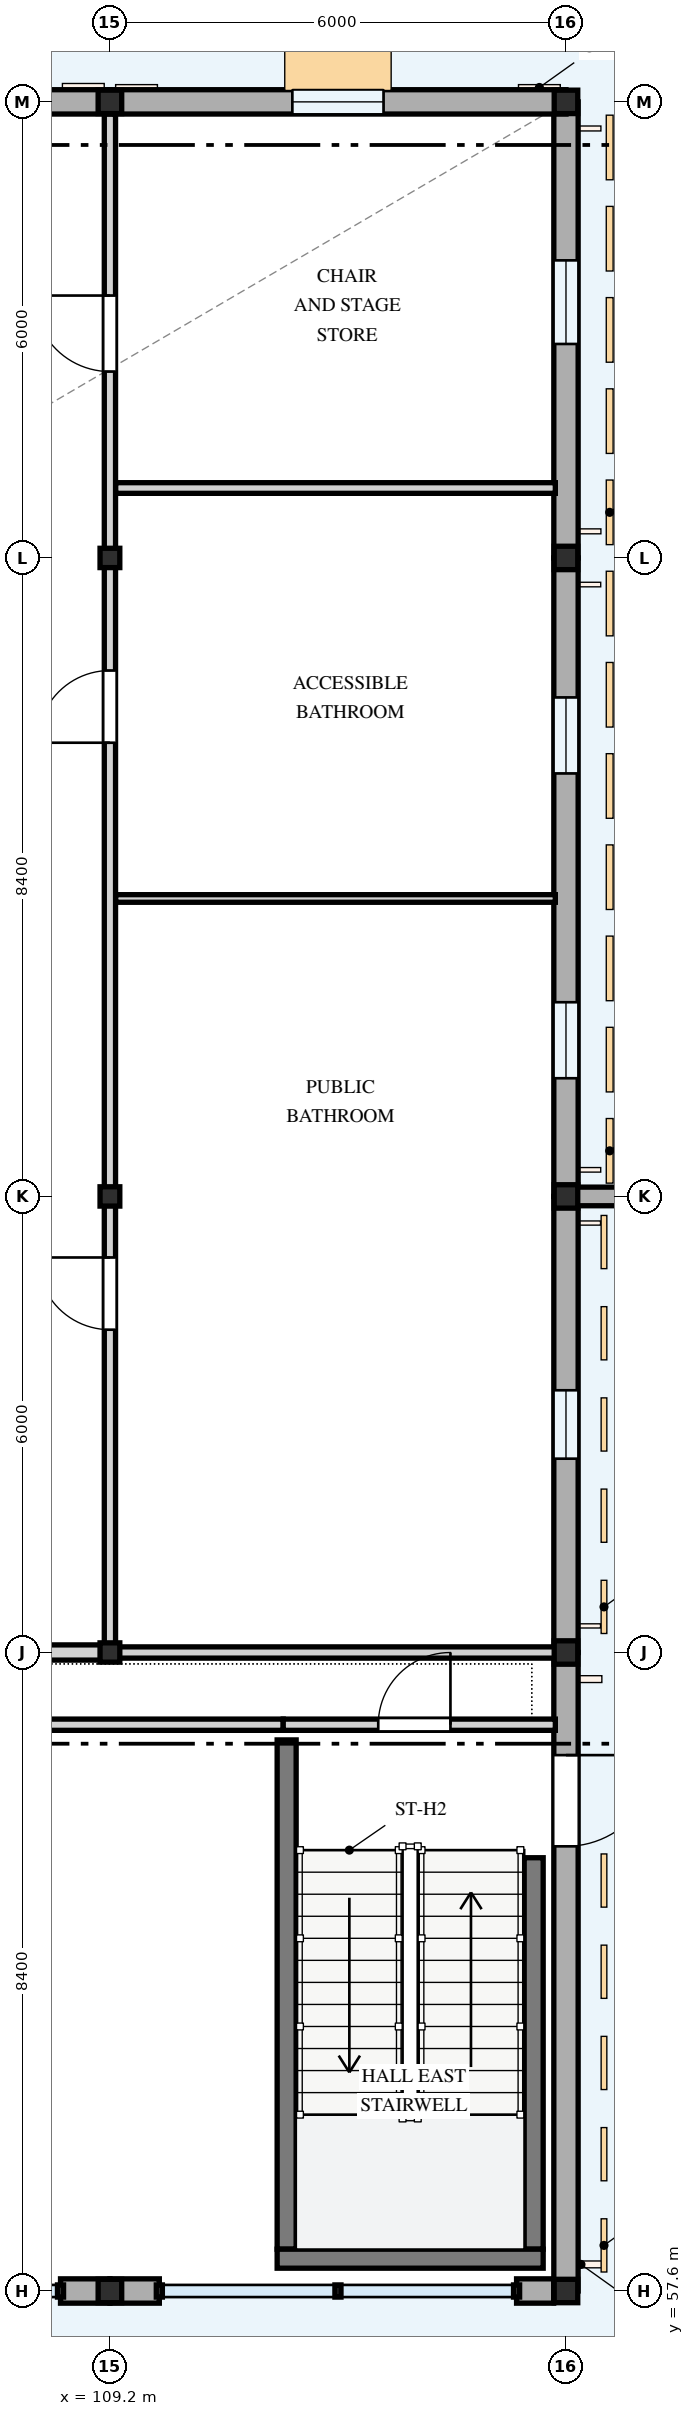
"""IFC4 building model, lengths in metres.
Left out: names, types, materials, properties, quantities, classifications, styles, units other than length and angle.
Written with IfcOpenShell. Run it as: python <this file> out.ifc"""

import sys

from ifc_helpers import new_model, si_unit, direction, frame, frame_2d, origin, origin_2d, place, context, subcontext, project, spatial, rectangle, i_section, extrude, element, fill, save


model = new_model("IFC4")
c1 = context("Model", 3, precision=1e-05, world=origin(), true_north=direction((0.0, 1.0)))
c2 = subcontext(c1, "Body", "Model", "MODEL_VIEW")
j1 = project(units=[si_unit("LENGTHUNIT", "METRE"), si_unit("PLANEANGLEUNIT", "RADIAN")], contexts=[c1])
p1 = place(None, origin())
s1 = spatial("IfcSite", under=j1, at=p1, CompositionType="ELEMENT")
p2 = place(p1, origin())
s2 = spatial("IfcBuilding", under=s1, at=p2, CompositionType="ELEMENT")
p3 = place(p2, origin())
s3 = spatial("IfcBuildingStorey", under=s2, at=p3, CompositionType="ELEMENT", Elevation=0.0)
p4 = place(p3, frame((109.2, 57.6, 0.0), z_axis=(0.0, 0.0, 1.0), x_axis=(1.0, 0.0, 0.0)))
e1 = element("IfcColumn", 1, at=p4, inside=s3, PredefinedType="COLUMN", context=c2, shape_type="SweptSolid", body=[
    extrude(i_section(OverallWidth=0.31, OverallDepth=0.308, WebThickness=0.015, FlangeThickness=0.015, FilletRadius=0.012, at=origin_2d()), origin(), (0.0, 0.0, 1.0), 4.5),
])
for number, where, z_axis, x_axis in (
    (2, (109.2, 66.0, 0.0), (0.0, 0.0, 1.0), (1.0, 0.0, 0.0)),
    (3, (109.2, 72.0, 0.0), (0.0, 0.0, 1.0), (1.0, 0.0, 0.0)),
    (4, (109.2, 80.4, 0.0), (0.0, 0.0, 1.0), (1.0, 0.0, 0.0)),
):
    element("IfcColumn", number, at=place(p3, frame(where, z_axis=z_axis, x_axis=x_axis)), inside=s3, PredefinedType="COLUMN", context=c2, shape_type="SweptSolid", body=[
        extrude(i_section(OverallWidth=0.26, OverallDepth=0.254, WebThickness=0.014, FlangeThickness=0.014, FilletRadius=0.01, at=origin_2d()), origin(), (0.0, 0.0, 1.0), 4.5),
    ])
for number, where, z_axis, x_axis in (
    (5, (109.2, 86.4, 0.0), (0.0, 0.0, 1.0), (1.0, 0.0, 0.0)),
    (6, (115.2, 57.6, 0.0), (0.0, 0.0, 1.0), (1.0, 0.0, 0.0)),
    (7, (115.2, 66.0, 0.0), (0.0, 0.0, 1.0), (1.0, 0.0, 0.0)),
    (8, (115.2, 72.0, 0.0), (0.0, 0.0, 1.0), (1.0, 0.0, 0.0)),
    (9, (115.2, 80.4, 0.0), (0.0, 0.0, 1.0), (1.0, 0.0, 0.0)),
    (10, (115.2, 86.4, 0.0), (0.0, 0.0, 1.0), (1.0, 0.0, 0.0)),
):
    element("IfcColumn", number, at=place(p3, frame(where, z_axis=z_axis, x_axis=x_axis)), inside=s3, PredefinedType="COLUMN", context=c2, shape_type="SweptSolid", body=[
        extrude(i_section(OverallWidth=0.31, OverallDepth=0.308, WebThickness=0.015, FlangeThickness=0.015, FilletRadius=0.012, at=origin_2d()), origin(), (0.0, 0.0, 1.0), 4.5),
    ])
p5 = place(p3, frame((108.55, 57.6, 0.0), z_axis=(0.0, 0.0, 1.0), x_axis=(1.0, 0.0, 0.0)))
e11 = element("IfcWall", 11, at=p5, inside=s3, PredefinedType="STANDARD", context=c2, shape_type="SweptSolid", body=[
    extrude(rectangle(XDim=0.65, YDim=0.32, at=frame_2d((0.325, 0.0))), origin(), (0.0, 0.0, 1.0), 3.646),
])
p6 = place(p3, frame((109.2, 57.6, 0.0), z_axis=(0.0, 0.0, 1.0), x_axis=(1.0, 0.0, 0.0)))
e12 = element("IfcWall", 12, at=p6, inside=s3, PredefinedType="STANDARD", context=c2, shape_type="SweptSolid", body=[
    extrude(rectangle(XDim=0.65, YDim=0.32, at=frame_2d((0.325, 0.0))), origin(), (0.0, 0.0, 1.0), 3.722),
])
p7 = place(p3, frame((114.55, 57.6, 0.0), z_axis=(0.0, 0.0, 1.0), x_axis=(1.0, 0.0, 0.0)))
e13 = element("IfcWall", 13, at=p7, inside=s3, PredefinedType="STANDARD", context=c2, shape_type="SweptSolid", body=[
    extrude(rectangle(XDim=0.488, YDim=0.32, at=frame_2d((0.244, 0.0))), origin(), (0.0, 0.0, 1.0), 3.722),
])
p8 = place(p3, frame((115.2, 57.6, 0.0), z_axis=(0.0, 0.0, 1.0), x_axis=(0.0, 1.0, 0.0)))
e14 = element("IfcWall", 14, at=p8, inside=s3, PredefinedType="STANDARD", context=c2, shape_type="SweptSolid", body=[
    extrude(rectangle(XDim=8.4, YDim=0.32, at=frame_2d((4.2, 0.0))), origin(), (0.0, 0.0, 1.0), 3.65),
])
p9 = place(p8, frame((5.85, 0.0, 0.0)))
e15 = element("IfcOpeningElement", 15, at=p9, cuts=e14, PredefinedType="OPENING", context=c2, shape_type="SweptSolid", body=[
    extrude(rectangle(XDim=1.2, YDim=2.2, at=frame_2d((0.6, 1.1))), frame((0.0, 0.17, 0.0), z_axis=(0.0, -1.0, 0.0), x_axis=(1.0, 0.0, 0.0)), (0.0, 0.0, 1.0), 0.34),
])
p10 = place(p3, frame((115.2, 66.0, 0.0), z_axis=(0.0, 0.0, 1.0), x_axis=(0.0, 1.0, 0.0)))
e16 = element("IfcWall", 16, at=p10, inside=s3, PredefinedType="STANDARD", context=c2, shape_type="SweptSolid", body=[
    extrude(rectangle(XDim=6.0, YDim=0.32, at=frame_2d((3.0, 0.0))), origin(), (0.0, 0.0, 1.0), 3.772),
])
p11 = place(p10, frame((2.55, 0.0, 0.85)))
e17 = element("IfcOpeningElement", 17, at=p11, cuts=e16, PredefinedType="OPENING", context=c2, shape_type="SweptSolid", body=[
    extrude(rectangle(XDim=0.9, YDim=1.2, at=frame_2d((0.45, 0.6))), frame((0.0, 0.17, 0.0), z_axis=(0.0, -1.0, 0.0), x_axis=(1.0, 0.0, 0.0)), (0.0, 0.0, 1.0), 0.34),
])
p12 = place(p3, frame((115.2, 72.0, 0.0), z_axis=(0.0, 0.0, 1.0), x_axis=(0.0, 1.0, 0.0)))
e18 = element("IfcWall", 18, at=p12, inside=s3, PredefinedType="STANDARD", context=c2, shape_type="SweptSolid", body=[
    extrude(rectangle(XDim=8.4, YDim=0.32, at=frame_2d((4.2, 0.0))), origin(), (0.0, 0.0, 1.0), 3.65),
])
p13 = place(p12, frame((1.555, 0.0, 0.85)))
e19 = element("IfcOpeningElement", 19, at=p13, cuts=e18, PredefinedType="OPENING", context=c2, shape_type="SweptSolid", body=[
    extrude(rectangle(XDim=1.0, YDim=1.25, at=frame_2d((0.5, 0.625))), frame((0.0, 0.17, 0.0), z_axis=(0.0, -1.0, 0.0), x_axis=(1.0, 0.0, 0.0)), (0.0, 0.0, 1.0), 0.34),
])
p14 = place(p12, frame((5.565, 0.0, 0.85)))
e20 = element("IfcOpeningElement", 20, at=p14, cuts=e18, PredefinedType="OPENING", context=c2, shape_type="SweptSolid", body=[
    extrude(rectangle(XDim=1.0, YDim=1.25, at=frame_2d((0.5, 0.625))), frame((0.0, 0.17, 0.0), z_axis=(0.0, -1.0, 0.0), x_axis=(1.0, 0.0, 0.0)), (0.0, 0.0, 1.0), 0.34),
])
p15 = place(p3, frame((115.2, 80.4, 0.0), z_axis=(0.0, 0.0, 1.0), x_axis=(0.0, 1.0, 0.0)))
e21 = element("IfcWall", 21, at=p15, inside=s3, PredefinedType="STANDARD", context=c2, shape_type="SweptSolid", body=[
    extrude(rectangle(XDim=6.0, YDim=0.32, at=frame_2d((3.0, 0.0))), origin(), (0.0, 0.0, 1.0), 3.772),
])
p16 = place(p15, frame((2.815, 0.0, 0.85)))
e22 = element("IfcOpeningElement", 22, at=p16, cuts=e21, PredefinedType="OPENING", context=c2, shape_type="SweptSolid", body=[
    extrude(rectangle(XDim=1.1, YDim=1.3, at=frame_2d((0.55, 0.65))), frame((0.0, 0.17, 0.0), z_axis=(0.0, -1.0, 0.0), x_axis=(1.0, 0.0, 0.0)), (0.0, 0.0, 1.0), 0.34),
])
p17 = place(p3, frame((115.2, 86.4, 0.0), z_axis=(0.0, 0.0, 1.0), x_axis=(-1.0, 0.0, 0.0)))
e23 = element("IfcWall", 23, at=p17, inside=s3, PredefinedType="STANDARD", context=c2, shape_type="SweptSolid", body=[
    extrude(rectangle(XDim=6.0, YDim=0.32, at=frame_2d((3.0, 0.0))), origin(), (0.0, 0.0, 1.0), 3.722),
])
p18 = place(p17, frame((2.4, 0.0, 0.85)))
e24 = element("IfcOpeningElement", 24, at=p18, cuts=e23, PredefinedType="OPENING", context=c2, shape_type="SweptSolid", body=[
    extrude(rectangle(XDim=1.2, YDim=1.35, at=frame_2d((0.6, 0.675))), frame((0.0, 0.17, 0.0), z_axis=(0.0, -1.0, 0.0), x_axis=(1.0, 0.0, 0.0)), (0.0, 0.0, 1.0), 0.34),
])
p19 = place(p3, frame((109.2, 86.4, 0.0), z_axis=(0.0, 0.0, 1.0), x_axis=(-1.0, 0.0, 0.0)))
e25 = element("IfcWall", 25, at=p19, inside=s3, PredefinedType="STANDARD", context=c2, shape_type="SweptSolid", body=[
    extrude(rectangle(XDim=8.4, YDim=0.32, at=frame_2d((4.2, 0.0))), origin(), (0.0, 0.0, 1.0), 3.646),
])
p20 = place(p19, frame((3.6, 0.0, 0.85)))
e26 = element("IfcOpeningElement", 26, at=p20, cuts=e25, PredefinedType="OPENING", context=c2, shape_type="SweptSolid", body=[
    extrude(rectangle(XDim=1.2, YDim=1.5, at=frame_2d((0.6, 0.75))), frame((0.0, 0.17, 0.0), z_axis=(0.0, -1.0, 0.0), x_axis=(1.0, 0.0, 0.0)), (0.0, 0.0, 1.0), 0.34),
])
p21 = place(p3, frame((115.2, 72.0, 0.0), z_axis=(0.0, 0.0, 1.0), x_axis=(1.0, 0.0, 0.0)))
e27 = element("IfcWall", 27, at=p21, inside=s3, PredefinedType="STANDARD", context=c2, shape_type="SweptSolid", body=[
    extrude(rectangle(XDim=22.8, YDim=0.245, at=frame_2d((11.4, 0.0))), origin(), (0.0, 0.0, 1.0), 2.35),
])
p22 = place(p21, frame((10.675, 0.0, 0.0)))
e28 = element("IfcOpeningElement", 28, at=p22, cuts=e27, PredefinedType="OPENING", context=c2, shape_type="SweptSolid", body=[
    extrude(rectangle(XDim=1.45, YDim=2.1, at=frame_2d((0.725, 1.05))), frame((0.0, 0.133, 0.0), z_axis=(0.0, -1.0, 0.0), x_axis=(1.0, 0.0, 0.0)), (0.0, 0.0, 1.0), 0.265),
])
p23 = place(p3, frame((111.525, 64.85, 0.0), z_axis=(0.0, 0.0, 1.0), x_axis=(0.0, -1.0, 0.0)))
e29 = element("IfcWall", 29, at=p23, inside=s3, PredefinedType="SHEAR", context=c2, shape_type="SweptSolid", body=[
    extrude(rectangle(XDim=6.7, YDim=0.25, at=frame_2d((3.35, 0.0))), origin(), (0.0, 0.0, 1.0), 4.2),
])
p24 = place(p3, frame((114.775, 63.3, 0.0), z_axis=(0.0, 0.0, 1.0), x_axis=(0.0, -1.0, 0.0)))
e30 = element("IfcWall", 30, at=p24, inside=s3, PredefinedType="SHEAR", context=c2, shape_type="SweptSolid", body=[
    extrude(rectangle(XDim=5.15, YDim=0.25, at=frame_2d((2.575, 0.0))), origin(), (0.0, 0.0, 1.0), 4.2),
])
p25 = place(p3, frame((111.4, 58.025, 0.0), z_axis=(0.0, 0.0, 1.0), x_axis=(1.0, 0.0, 0.0)))
e31 = element("IfcWall", 31, at=p25, inside=s3, PredefinedType="SHEAR", context=c2, shape_type="SweptSolid", body=[
    extrude(rectangle(XDim=3.5, YDim=0.25, at=frame_2d((1.75, 0.0))), origin(), (0.0, 0.0, 1.0), 4.2),
])
p26 = place(p3, frame((72.0, 66.0, 0.0), z_axis=(0.0, 0.0, 1.0), x_axis=(1.0, 0.0, 0.0)))
e32 = element("IfcWall", 32, at=p26, inside=s3, PredefinedType="PARTITIONING", context=c2, shape_type="SweptSolid", body=[
    extrude(rectangle(XDim=37.2, YDim=0.2, at=frame_2d((18.6, 0.0))), origin(), (0.0, 0.0, 1.0), 3.266),
])
p27 = place(p26, frame((17.001, 0.0, 0.0)))
e33 = element("IfcOpeningElement", 33, at=p27, cuts=e32, PredefinedType="OPENING", context=c2, shape_type="SweptSolid", body=[
    extrude(rectangle(XDim=1.65, YDim=2.3, at=frame_2d((0.825, 1.15))), frame((0.0, 0.11, 0.0), z_axis=(0.0, -1.0, 0.0), x_axis=(1.0, 0.0, 0.0)), (0.0, 0.0, 1.0), 0.22),
])
p28 = place(p26, frame((25.391, 0.0, 0.0)))
e34 = element("IfcOpeningElement", 34, at=p28, cuts=e32, PredefinedType="OPENING", context=c2, shape_type="SweptSolid", body=[
    extrude(rectangle(XDim=1.8, YDim=2.4, at=frame_2d((0.9, 1.2))), frame((0.0, 0.11, 0.0), z_axis=(0.0, -1.0, 0.0), x_axis=(1.0, 0.0, 0.0)), (0.0, 0.0, 1.0), 0.22),
])
p29 = place(p3, frame((109.2, 66.102, 0.0), z_axis=(0.0, 0.0, 1.0), x_axis=(0.0, 1.0, 0.0)))
e35 = element("IfcWall", 35, at=p29, inside=s3, PredefinedType="PARTITIONING", context=c2, shape_type="SweptSolid", body=[
    extrude(rectangle(XDim=20.136, YDim=0.148, at=frame_2d((10.068, 0.0))), origin(), (0.0, 0.0, 1.0), 3.65),
])
p30 = place(p29, frame((4.145, 0.0, 0.0)))
e36 = element("IfcOpeningElement", 36, at=p30, cuts=e35, PredefinedType="OPENING", context=c2, shape_type="SweptSolid", body=[
    extrude(rectangle(XDim=0.95, YDim=2.1, at=frame_2d((0.475, 1.05))), frame((0.0, 0.084, 0.0), z_axis=(0.0, -1.0, 0.0), x_axis=(1.0, 0.0, 0.0)), (0.0, 0.0, 1.0), 0.168),
])
p31 = place(p29, frame((11.867, 0.0, 0.0)))
e37 = element("IfcOpeningElement", 37, at=p31, cuts=e35, PredefinedType="OPENING", context=c2, shape_type="SweptSolid", body=[
    extrude(rectangle(XDim=0.95, YDim=2.1, at=frame_2d((0.475, 1.05))), frame((0.0, 0.084, 0.0), z_axis=(0.0, -1.0, 0.0), x_axis=(1.0, 0.0, 0.0)), (0.0, 0.0, 1.0), 0.168),
])
p32 = place(p29, frame((16.75, 0.0, 0.0)))
e38 = element("IfcOpeningElement", 38, at=p32, cuts=e35, PredefinedType="OPENING", context=c2, shape_type="SweptSolid", body=[
    extrude(rectangle(XDim=1.0, YDim=2.1, at=frame_2d((0.5, 1.05))), frame((0.0, 0.084, 0.0), z_axis=(0.0, -1.0, 0.0), x_axis=(1.0, 0.0, 0.0)), (0.0, 0.0, 1.0), 0.168),
])
p33 = place(p3, frame((109.2, 66.0, 0.0), z_axis=(0.0, 0.0, 1.0), x_axis=(1.0, 0.0, 0.0)))
e39 = element("IfcWall", 39, at=p33, inside=s3, PredefinedType="PARTITIONING", context=c2, shape_type="SweptSolid", body=[
    extrude(rectangle(XDim=5.86, YDim=0.148, at=frame_2d((2.93, 0.0))), origin(), (0.0, 0.0, 1.0), 3.722),
])
p34 = place(p3, frame((109.276, 75.92, 0.0), z_axis=(0.0, 0.0, 1.0), x_axis=(1.0, 0.0, 0.0)))
e40 = element("IfcWall", 40, at=p34, inside=s3, PredefinedType="PARTITIONING", context=c2, shape_type="SweptSolid", body=[
    extrude(rectangle(XDim=5.784, YDim=0.1, at=frame_2d((2.892, 0.0))), origin(), (0.0, 0.0, 1.0), 4.2),
])
p35 = place(p3, frame((109.276, 81.32, 0.0), z_axis=(0.0, 0.0, 1.0), x_axis=(1.0, 0.0, 0.0)))
e41 = element("IfcWall", 41, at=p35, inside=s3, PredefinedType="PARTITIONING", context=c2, shape_type="SweptSolid", body=[
    extrude(rectangle(XDim=5.784, YDim=0.14, at=frame_2d((2.892, 0.0))), origin(), (0.0, 0.0, 1.0), 4.2),
])
p36 = place(p3, frame((100.796, 65.05, 0.0), z_axis=(0.0, 0.0, 1.0), x_axis=(1.0, 0.0, 0.0)))
e42 = element("IfcWall", 42, at=p36, inside=s3, PredefinedType="PARTITIONING", context=c2, shape_type="SweptSolid", body=[
    extrude(rectangle(XDim=10.684, YDim=0.148, at=frame_2d((5.342, 0.0))), origin(), (0.0, 0.0, 1.0), 4.2),
])
p37 = place(p3, frame((111.48, 65.05, 0.0), z_axis=(0.0, 0.0, 1.0), x_axis=(1.0, 0.0, 0.0)))
e43 = element("IfcWall", 43, at=p37, inside=s3, PredefinedType="PARTITIONING", context=c2, shape_type="SweptSolid", body=[
    extrude(rectangle(XDim=3.58, YDim=0.148, at=frame_2d((1.79, 0.0))), origin(), (0.0, 0.0, 1.0), 4.2),
])
p38 = place(p37, frame((1.25, 0.0, 0.0)))
e44 = element("IfcOpeningElement", 44, at=p38, cuts=e43, PredefinedType="OPENING", context=c2, shape_type="SweptSolid", body=[
    extrude(rectangle(XDim=0.95, YDim=2.1, at=frame_2d((0.475, 1.05))), frame((0.0, 0.084, 0.0), z_axis=(0.0, -1.0, 0.0), x_axis=(1.0, 0.0, 0.0)), (0.0, 0.0, 1.0), 0.168),
])
p39 = place(p9, frame((1.2, 0.0, 0.0), z_axis=(0.0, 0.0, 1.0), x_axis=(-1.0, 0.0, 0.0)))
e45 = element("IfcDoor", 45, at=p39, inside=s3, OperationType="SINGLE_SWING_LEFT", PredefinedType="DOOR", context=c2, shape_type="SweptSolid", body=[
    extrude(rectangle(XDim=1.2, YDim=2.2, at=frame_2d((0.6, 1.1))), frame((0.0, 0.025, 0.0), z_axis=(0.0, -1.0, 0.0), x_axis=(1.0, 0.0, 0.0)), (0.0, 0.0, 1.0), 0.05),
])
fill(e15, e45)
p40 = place(p11, origin())
e46 = element("IfcWindow", 46, at=p40, inside=s3, PartitioningType="SINGLE_PANEL", PredefinedType="WINDOW", context=c2, shape_type="SweptSolid", body=[
    extrude(rectangle(XDim=0.9, YDim=1.2, at=frame_2d((0.45, 0.6))), frame((0.0, 0.03, 0.0), z_axis=(0.0, -1.0, 0.0), x_axis=(1.0, 0.0, 0.0)), (0.0, 0.0, 1.0), 0.06),
])
fill(e17, e46)
p41 = place(p13, origin())
e47 = element("IfcWindow", 47, at=p41, inside=s3, PartitioningType="SINGLE_PANEL", PredefinedType="WINDOW", context=c2, shape_type="SweptSolid", body=[
    extrude(rectangle(XDim=1.0, YDim=1.25, at=frame_2d((0.5, 0.625))), frame((0.0, 0.03, 0.0), z_axis=(0.0, -1.0, 0.0), x_axis=(1.0, 0.0, 0.0)), (0.0, 0.0, 1.0), 0.06),
])
fill(e19, e47)
p42 = place(p14, origin())
e48 = element("IfcWindow", 48, at=p42, inside=s3, PartitioningType="SINGLE_PANEL", PredefinedType="WINDOW", context=c2, shape_type="SweptSolid", body=[
    extrude(rectangle(XDim=1.0, YDim=1.25, at=frame_2d((0.5, 0.625))), frame((0.0, 0.03, 0.0), z_axis=(0.0, -1.0, 0.0), x_axis=(1.0, 0.0, 0.0)), (0.0, 0.0, 1.0), 0.06),
])
fill(e20, e48)
p43 = place(p16, origin())
e49 = element("IfcWindow", 49, at=p43, inside=s3, PartitioningType="SINGLE_PANEL", PredefinedType="WINDOW", context=c2, shape_type="SweptSolid", body=[
    extrude(rectangle(XDim=1.1, YDim=1.3, at=frame_2d((0.55, 0.65))), frame((0.0, 0.03, 0.0), z_axis=(0.0, -1.0, 0.0), x_axis=(1.0, 0.0, 0.0)), (0.0, 0.0, 1.0), 0.06),
])
fill(e22, e49)
p44 = place(p18, origin())
e50 = element("IfcWindow", 50, at=p44, inside=s3, PartitioningType="SINGLE_PANEL", PredefinedType="WINDOW", context=c2, shape_type="SweptSolid", body=[
    extrude(rectangle(XDim=1.2, YDim=1.35, at=frame_2d((0.6, 0.675))), frame((0.0, 0.03, 0.0), z_axis=(0.0, -1.0, 0.0), x_axis=(1.0, 0.0, 0.0)), (0.0, 0.0, 1.0), 0.06),
])
fill(e24, e50)
p45 = place(p30, origin())
e51 = element("IfcDoor", 51, at=p45, inside=s3, OperationType="SINGLE_SWING_RIGHT", PredefinedType="DOOR", context=c2, shape_type="SweptSolid", body=[
    extrude(rectangle(XDim=0.95, YDim=2.1, at=frame_2d((0.475, 1.05))), frame((0.0, 0.025, 0.0), z_axis=(0.0, -1.0, 0.0), x_axis=(1.0, 0.0, 0.0)), (0.0, 0.0, 1.0), 0.05),
])
fill(e36, e51)
p46 = place(p31, origin())
e52 = element("IfcDoor", 52, at=p46, inside=s3, OperationType="SINGLE_SWING_LEFT", PredefinedType="DOOR", context=c2, shape_type="SweptSolid", body=[
    extrude(rectangle(XDim=0.95, YDim=2.1, at=frame_2d((0.475, 1.05))), frame((0.0, 0.025, 0.0), z_axis=(0.0, -1.0, 0.0), x_axis=(1.0, 0.0, 0.0)), (0.0, 0.0, 1.0), 0.05),
])
fill(e37, e52)
p47 = place(p32, origin())
e53 = element("IfcDoor", 53, at=p47, inside=s3, OperationType="SINGLE_SWING_RIGHT", PredefinedType="DOOR", context=c2, shape_type="SweptSolid", body=[
    extrude(rectangle(XDim=1.0, YDim=2.1, at=frame_2d((0.5, 1.05))), frame((0.0, 0.025, 0.0), z_axis=(0.0, -1.0, 0.0), x_axis=(1.0, 0.0, 0.0)), (0.0, 0.0, 1.0), 0.05),
])
fill(e38, e53)
p48 = place(p38, origin())
e54 = element("IfcDoor", 54, at=p48, inside=s3, OperationType="SINGLE_SWING_RIGHT", PredefinedType="DOOR", context=c2, shape_type="SweptSolid", body=[
    extrude(rectangle(XDim=0.95, YDim=2.1, at=frame_2d((0.475, 1.05))), frame((0.0, 0.025, 0.0), z_axis=(0.0, -1.0, 0.0), x_axis=(1.0, 0.0, 0.0)), (0.0, 0.0, 1.0), 0.05),
])
fill(e44, e54)
save(model, sys.argv[1])
